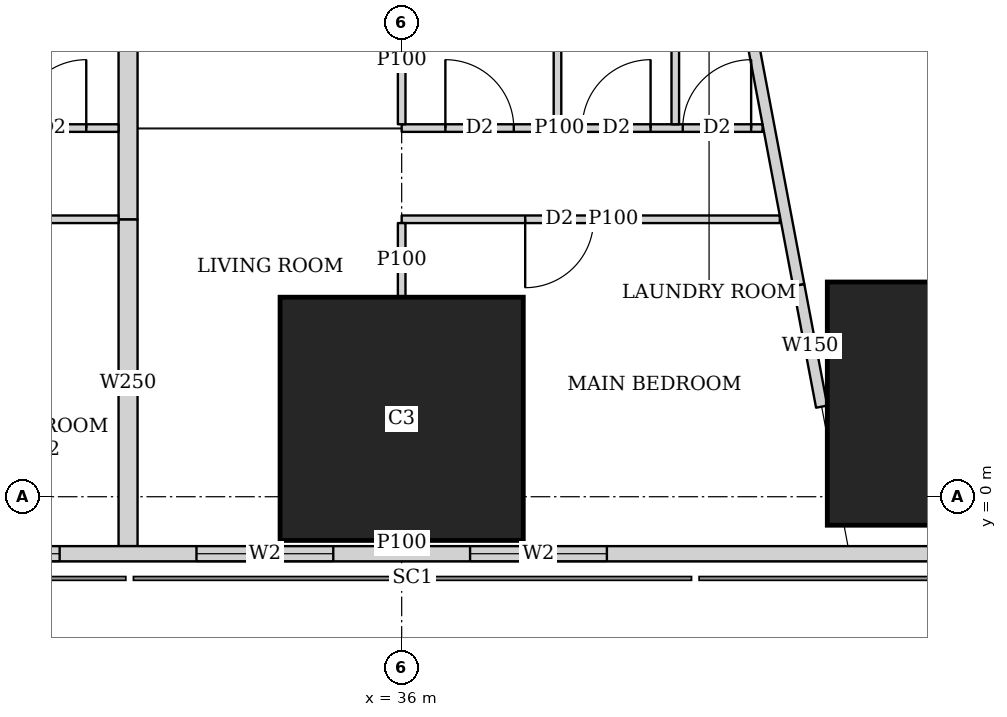
"""IFC4 building model, lengths in metres.
Left out: names, types, materials, properties, quantities, classifications, styles, units other than length and angle.
Written with IfcOpenShell. Run it as: python <this file> out.ifc"""

import sys

from ifc_helpers import new_model, si_unit, direction, frame, frame_2d, origin, origin_2d, place, context, subcontext, project, spatial, rectangle, extrude, element, fill, save


model = new_model("IFC4")
c1 = context("Model", 3, precision=1e-05, world=origin(), true_north=direction((0.0, 1.0)))
c2 = subcontext(c1, "Body", "Model", "MODEL_VIEW")
j1 = project(units=[si_unit("LENGTHUNIT", "METRE"), si_unit("PLANEANGLEUNIT", "RADIAN")], contexts=[c1])
p1 = place(None, origin())
s1 = spatial("IfcSite", under=j1, at=p1, CompositionType="ELEMENT")
p2 = place(p1, origin())
s2 = spatial("IfcBuilding", under=s1, at=p2, CompositionType="ELEMENT")
p3 = place(p2, frame((0.0, 0.0, 23.75)))
s3 = spatial("IfcBuildingStorey", under=s2, at=p3, CompositionType="ELEMENT", Elevation=23.75)
for number, where, z_axis, x_axis in (
    (1, (36.0, 1.025, 0.0), (0.0, 0.0, 1.0), (1.0, 0.0, 0.0)),
    (2, (43.2, 1.225, 0.0), (0.0, 0.0, 1.0), (1.0, 0.0, 0.0)),
):
    element("IfcColumn", number, at=place(p3, frame(where, z_axis=z_axis, x_axis=x_axis)), inside=s3, PredefinedType="COLUMN", context=c2, shape_type="SweptSolid", body=[
        extrude(rectangle(XDim=3.2, YDim=3.2, at=origin_2d()), origin(), (0.0, 0.0, 1.0), 3.75),
    ])
p4 = place(p3, frame((2.163, -0.75, 0.0), z_axis=(0.0, 0.0, 1.0), x_axis=(1.0, 0.0, 0.0)))
e3 = element("IfcWall", 3, at=p4, inside=s3, PredefinedType="SOLIDWALL", context=c2, shape_type="SweptSolid", body=[
    extrude(rectangle(XDim=45.628, YDim=0.2, at=frame_2d((22.814, 0.0))), origin(), (0.0, 0.0, 1.0), 3.5),
])
p5 = place(p4, frame((9.537, 0.0, 0.9)))
e4 = element("IfcOpeningElement", 4, at=p5, cuts=e3, PredefinedType="OPENING", context=c2, shape_type="SweptSolid", body=[
    extrude(rectangle(XDim=1.8, YDim=1.5, at=frame_2d((0.9, 0.75))), frame((0.0, 0.11, 0.0), z_axis=(0.0, -1.0, 0.0), x_axis=(1.0, 0.0, 0.0)), (0.0, 0.0, 1.0), 0.22),
])
p6 = place(p4, frame((13.137, 0.0, 0.9)))
e5 = element("IfcOpeningElement", 5, at=p6, cuts=e3, PredefinedType="OPENING", context=c2, shape_type="SweptSolid", body=[
    extrude(rectangle(XDim=1.8, YDim=1.5, at=frame_2d((0.9, 0.75))), frame((0.0, 0.11, 0.0), z_axis=(0.0, -1.0, 0.0), x_axis=(1.0, 0.0, 0.0)), (0.0, 0.0, 1.0), 0.22),
])
p7 = place(p4, frame((16.737, 0.0, 0.9)))
e6 = element("IfcOpeningElement", 6, at=p7, cuts=e3, PredefinedType="OPENING", context=c2, shape_type="SweptSolid", body=[
    extrude(rectangle(XDim=1.8, YDim=1.5, at=frame_2d((0.9, 0.75))), frame((0.0, 0.11, 0.0), z_axis=(0.0, -1.0, 0.0), x_axis=(1.0, 0.0, 0.0)), (0.0, 0.0, 1.0), 0.22),
])
p8 = place(p4, frame((20.337, 0.0, 0.9)))
e7 = element("IfcOpeningElement", 7, at=p8, cuts=e3, PredefinedType="OPENING", context=c2, shape_type="SweptSolid", body=[
    extrude(rectangle(XDim=1.8, YDim=1.5, at=frame_2d((0.9, 0.75))), frame((0.0, 0.11, 0.0), z_axis=(0.0, -1.0, 0.0), x_axis=(1.0, 0.0, 0.0)), (0.0, 0.0, 1.0), 0.22),
])
p9 = place(p4, frame((23.937, 0.0, 0.9)))
e8 = element("IfcOpeningElement", 8, at=p9, cuts=e3, PredefinedType="OPENING", context=c2, shape_type="SweptSolid", body=[
    extrude(rectangle(XDim=1.8, YDim=1.5, at=frame_2d((0.9, 0.75))), frame((0.0, 0.11, 0.0), z_axis=(0.0, -1.0, 0.0), x_axis=(1.0, 0.0, 0.0)), (0.0, 0.0, 1.0), 0.22),
])
p10 = place(p4, frame((27.537, 0.0, 0.9)))
e9 = element("IfcOpeningElement", 9, at=p10, cuts=e3, PredefinedType="OPENING", context=c2, shape_type="SweptSolid", body=[
    extrude(rectangle(XDim=1.8, YDim=1.5, at=frame_2d((0.9, 0.75))), frame((0.0, 0.11, 0.0), z_axis=(0.0, -1.0, 0.0), x_axis=(1.0, 0.0, 0.0)), (0.0, 0.0, 1.0), 0.22),
])
p11 = place(p4, frame((31.137, 0.0, 0.9)))
e10 = element("IfcOpeningElement", 10, at=p11, cuts=e3, PredefinedType="OPENING", context=c2, shape_type="SweptSolid", body=[
    extrude(rectangle(XDim=1.8, YDim=1.5, at=frame_2d((0.9, 0.75))), frame((0.0, 0.11, 0.0), z_axis=(0.0, -1.0, 0.0), x_axis=(1.0, 0.0, 0.0)), (0.0, 0.0, 1.0), 0.22),
])
p12 = place(p4, frame((34.737, 0.0, 0.9)))
e11 = element("IfcOpeningElement", 11, at=p12, cuts=e3, PredefinedType="OPENING", context=c2, shape_type="SweptSolid", body=[
    extrude(rectangle(XDim=1.8, YDim=1.5, at=frame_2d((0.9, 0.75))), frame((0.0, 0.11, 0.0), z_axis=(0.0, -1.0, 0.0), x_axis=(1.0, 0.0, 0.0)), (0.0, 0.0, 1.0), 0.22),
])
p13 = place(p3, frame((50.653, 2.703, 0.0), z_axis=(0.0, 0.0, 1.0), x_axis=(-0.185612026696, 0.982623109613, 0.0)))
e12 = element("IfcWall", 12, at=p13, inside=s3, PredefinedType="SOLIDWALL", context=c2, shape_type="SweptSolid", body=[
    extrude(rectangle(XDim=41.393, YDim=0.2, at=frame_2d((20.697, 0.0))), origin(), (0.0, 0.0, 1.0), 3.5),
])
p14 = place(p13, frame((1.633, 0.0, 0.9)))
e13 = element("IfcOpeningElement", 13, at=p14, cuts=e12, PredefinedType="OPENING", context=c2, shape_type="SweptSolid", body=[
    extrude(rectangle(XDim=1.8, YDim=1.5, at=frame_2d((0.9, 0.75))), frame((0.0, 0.11, 0.0), z_axis=(0.0, -1.0, 0.0), x_axis=(1.0, 0.0, 0.0)), (0.0, 0.0, 1.0), 0.22),
])
p15 = place(p13, frame((6.032, 0.0, 0.9)))
e14 = element("IfcOpeningElement", 14, at=p15, cuts=e12, PredefinedType="OPENING", context=c2, shape_type="SweptSolid", body=[
    extrude(rectangle(XDim=1.8, YDim=1.5, at=frame_2d((0.9, 0.75))), frame((0.0, 0.11, 0.0), z_axis=(0.0, -1.0, 0.0), x_axis=(1.0, 0.0, 0.0)), (0.0, 0.0, 1.0), 0.22),
])
p16 = place(p13, frame((9.848, 0.0, 0.9)))
e15 = element("IfcOpeningElement", 15, at=p16, cuts=e12, PredefinedType="OPENING", context=c2, shape_type="SweptSolid", body=[
    extrude(rectangle(XDim=1.8, YDim=1.5, at=frame_2d((0.9, 0.75))), frame((0.0, 0.11, 0.0), z_axis=(0.0, -1.0, 0.0), x_axis=(1.0, 0.0, 0.0)), (0.0, 0.0, 1.0), 0.22),
])
p17 = place(p13, frame((17.481, 0.0, 0.9)))
e16 = element("IfcOpeningElement", 16, at=p17, cuts=e12, PredefinedType="OPENING", context=c2, shape_type="SweptSolid", body=[
    extrude(rectangle(XDim=1.8, YDim=1.5, at=frame_2d((0.9, 0.75))), frame((0.0, 0.11, 0.0), z_axis=(0.0, -1.0, 0.0), x_axis=(1.0, 0.0, 0.0)), (0.0, 0.0, 1.0), 0.22),
])
p18 = place(p13, frame((21.297, 0.0, 0.9)))
e17 = element("IfcOpeningElement", 17, at=p18, cuts=e12, PredefinedType="OPENING", context=c2, shape_type="SweptSolid", body=[
    extrude(rectangle(XDim=1.8, YDim=1.5, at=frame_2d((0.9, 0.75))), frame((0.0, 0.11, 0.0), z_axis=(0.0, -1.0, 0.0), x_axis=(1.0, 0.0, 0.0)), (0.0, 0.0, 1.0), 0.22),
])
p19 = place(p13, frame((25.113, 0.0, 0.9)))
e18 = element("IfcOpeningElement", 18, at=p19, cuts=e12, PredefinedType="OPENING", context=c2, shape_type="SweptSolid", body=[
    extrude(rectangle(XDim=1.8, YDim=1.5, at=frame_2d((0.9, 0.75))), frame((0.0, 0.11, 0.0), z_axis=(0.0, -1.0, 0.0), x_axis=(1.0, 0.0, 0.0)), (0.0, 0.0, 1.0), 0.22),
])
p20 = place(p13, frame((28.93, 0.0, 0.9)))
e19 = element("IfcOpeningElement", 19, at=p20, cuts=e12, PredefinedType="OPENING", context=c2, shape_type="SweptSolid", body=[
    extrude(rectangle(XDim=1.8, YDim=1.5, at=frame_2d((0.9, 0.75))), frame((0.0, 0.11, 0.0), z_axis=(0.0, -1.0, 0.0), x_axis=(1.0, 0.0, 0.0)), (0.0, 0.0, 1.0), 0.22),
])
p21 = place(p13, frame((32.746, 0.0, 0.9)))
e20 = element("IfcOpeningElement", 20, at=p21, cuts=e12, PredefinedType="OPENING", context=c2, shape_type="SweptSolid", body=[
    extrude(rectangle(XDim=1.8, YDim=1.5, at=frame_2d((0.9, 0.75))), frame((0.0, 0.11, 0.0), z_axis=(0.0, -1.0, 0.0), x_axis=(1.0, 0.0, 0.0)), (0.0, 0.0, 1.0), 0.22),
])
p22 = place(p13, frame((36.481, 0.0, 0.9)))
e21 = element("IfcOpeningElement", 21, at=p22, cuts=e12, PredefinedType="OPENING", context=c2, shape_type="SweptSolid", body=[
    extrude(rectangle(XDim=1.8, YDim=1.5, at=frame_2d((0.9, 0.75))), frame((0.0, 0.11, 0.0), z_axis=(0.0, -1.0, 0.0), x_axis=(1.0, 0.0, 0.0)), (0.0, 0.0, 1.0), 0.22),
])
p23 = place(p3, frame((33.755, 42.325, 0.0), z_axis=(0.0, 0.0, 1.0), x_axis=(0.185611461091, -0.982623216453, 0.0)))
e22 = element("IfcWall", 22, at=p23, inside=s3, PredefinedType="SOLIDWALL", context=c2, shape_type="SweptSolid", body=[
    extrude(rectangle(XDim=40.241, YDim=0.15, at=frame_2d((20.121, 0.0))), origin(), (0.0, 0.0, 1.0), 2.5),
])
p24 = place(p23, frame((7.325, 0.0, 0.0)))
e23 = element("IfcOpeningElement", 23, at=p24, cuts=e22, PredefinedType="OPENING", context=c2, shape_type="SweptSolid", body=[
    extrude(rectangle(XDim=1.0, YDim=2.1, at=frame_2d((0.5, 1.05))), frame((0.0, 0.085, 0.0), z_axis=(0.0, -1.0, 0.0), x_axis=(1.0, 0.0, 0.0)), (0.0, 0.0, 1.0), 0.17),
])
p25 = place(p23, frame((11.902, 0.0, 0.0)))
e24 = element("IfcOpeningElement", 24, at=p25, cuts=e22, PredefinedType="OPENING", context=c2, shape_type="SweptSolid", body=[
    extrude(rectangle(XDim=1.0, YDim=2.1, at=frame_2d((0.5, 1.05))), frame((0.0, 0.085, 0.0), z_axis=(0.0, -1.0, 0.0), x_axis=(1.0, 0.0, 0.0)), (0.0, 0.0, 1.0), 0.17),
])
p26 = place(p23, frame((25.718, 0.0, 0.0)))
e25 = element("IfcOpeningElement", 25, at=p26, cuts=e22, PredefinedType="OPENING", context=c2, shape_type="SweptSolid", body=[
    extrude(rectangle(XDim=1.0, YDim=2.1, at=frame_2d((0.5, 1.05))), frame((0.0, 0.085, 0.0), z_axis=(0.0, -1.0, 0.0), x_axis=(1.0, 0.0, 0.0)), (0.0, 0.0, 1.0), 0.17),
])
p27 = place(p23, frame((31.788, 0.0, 0.0)))
e26 = element("IfcOpeningElement", 26, at=p27, cuts=e22, PredefinedType="OPENING", context=c2, shape_type="SweptSolid", body=[
    extrude(rectangle(XDim=1.0, YDim=2.1, at=frame_2d((0.5, 1.05))), frame((0.0, 0.085, 0.0), z_axis=(0.0, -1.0, 0.0), x_axis=(1.0, 0.0, 0.0)), (0.0, 0.0, 1.0), 0.17),
])
p28 = place(p3, frame((41.224, 2.783, 0.0), z_axis=(0.0, 0.0, 1.0), x_axis=(0.185566507215, -0.982631706897, 0.0)))
e27 = element("IfcWall", 27, at=p28, inside=s3, PredefinedType="SOLIDWALL", context=c2, shape_type="SweptSolid", body=[
    extrude(rectangle(XDim=1.626, YDim=0.15, at=frame_2d((0.813, 0.0))), origin(), (0.0, 0.0, 1.0), 2.05),
])
p29 = place(p3, frame((32.275, 3.65, 0.0), z_axis=(0.0, 0.0, 1.0), x_axis=(-1.0, 0.0, 0.0)))
e28 = element("IfcWall", 28, at=p29, inside=s3, PredefinedType="PARTITIONING", context=c2, shape_type="SweptSolid", body=[
    extrude(rectangle(XDim=7.075, YDim=0.1, at=frame_2d((3.538, 0.0))), origin(), (0.0, 0.0, 1.0), 3.5),
])
p30 = place(p29, frame((5.975, 0.0, 0.0)))
e29 = element("IfcOpeningElement", 29, at=p30, cuts=e28, PredefinedType="OPENING", context=c2, shape_type="SweptSolid", body=[
    extrude(rectangle(XDim=0.9, YDim=2.1, at=frame_2d((0.45, 1.05))), frame((0.0, 0.06, 0.0), z_axis=(0.0, -1.0, 0.0), x_axis=(1.0, 0.0, 0.0)), (0.0, 0.0, 1.0), 0.12),
])
p31 = place(p29, frame((0.95, 0.0, 0.0)))
e30 = element("IfcOpeningElement", 30, at=p31, cuts=e28, PredefinedType="OPENING", context=c2, shape_type="SweptSolid", body=[
    extrude(rectangle(XDim=0.9, YDim=2.1, at=frame_2d((0.45, 1.05))), frame((0.0, 0.06, 0.0), z_axis=(0.0, -1.0, 0.0), x_axis=(1.0, 0.0, 0.0)), (0.0, 0.0, 1.0), 0.12),
])
p32 = place(p3, frame((32.275, 4.85, 0.0), z_axis=(0.0, 0.0, 1.0), x_axis=(-1.0, 0.0, 0.0)))
e31 = element("IfcWall", 31, at=p32, inside=s3, PredefinedType="PARTITIONING", context=c2, shape_type="SweptSolid", body=[
    extrude(rectangle(XDim=7.075, YDim=0.1, at=frame_2d((3.538, 0.0))), origin(), (0.0, 0.0, 1.0), 3.5),
])
p33 = place(p32, frame((5.6, 0.0, 0.0)))
e32 = element("IfcOpeningElement", 32, at=p33, cuts=e31, PredefinedType="OPENING", context=c2, shape_type="SweptSolid", body=[
    extrude(rectangle(XDim=0.9, YDim=2.1, at=frame_2d((0.45, 1.05))), frame((0.0, 0.06, 0.0), z_axis=(0.0, -1.0, 0.0), x_axis=(1.0, 0.0, 0.0)), (0.0, 0.0, 1.0), 0.12),
])
p34 = place(p32, frame((2.225, 0.0, 0.0)))
e33 = element("IfcOpeningElement", 33, at=p34, cuts=e31, PredefinedType="OPENING", context=c2, shape_type="SweptSolid", body=[
    extrude(rectangle(XDim=0.9, YDim=2.1, at=frame_2d((0.45, 1.05))), frame((0.0, 0.06, 0.0), z_axis=(0.0, -1.0, 0.0), x_axis=(1.0, 0.0, 0.0)), (0.0, 0.0, 1.0), 0.12),
])
p35 = place(p32, frame((3.8, 0.0, 0.0)))
e34 = element("IfcOpeningElement", 34, at=p35, cuts=e31, PredefinedType="OPENING", context=c2, shape_type="SweptSolid", body=[
    extrude(rectangle(XDim=0.9, YDim=2.1, at=frame_2d((0.45, 1.05))), frame((0.0, 0.06, 0.0), z_axis=(0.0, -1.0, 0.0), x_axis=(1.0, 0.0, 0.0)), (0.0, 0.0, 1.0), 0.12),
])
p36 = place(p32, frame((0.425, 0.0, 0.0)))
e35 = element("IfcOpeningElement", 35, at=p36, cuts=e31, PredefinedType="OPENING", context=c2, shape_type="SweptSolid", body=[
    extrude(rectangle(XDim=0.9, YDim=2.1, at=frame_2d((0.45, 1.05))), frame((0.0, 0.06, 0.0), z_axis=(0.0, -1.0, 0.0), x_axis=(1.0, 0.0, 0.0)), (0.0, 0.0, 1.0), 0.12),
])
p37 = place(p3, frame((40.975, 3.65, 0.0), z_axis=(0.0, 0.0, 1.0), x_axis=(-1.0, 0.0, 0.0)))
e36 = element("IfcWall", 36, at=p37, inside=s3, PredefinedType="PARTITIONING", context=c2, shape_type="SweptSolid", body=[
    extrude(rectangle(XDim=4.975, YDim=0.1, at=frame_2d((2.488, 0.0))), origin(), (0.0, 0.0, 1.0), 3.5),
])
p38 = place(p37, frame((2.45, 0.0, 0.0)))
e37 = element("IfcOpeningElement", 37, at=p38, cuts=e36, PredefinedType="OPENING", context=c2, shape_type="SweptSolid", body=[
    extrude(rectangle(XDim=0.9, YDim=2.1, at=frame_2d((0.45, 1.05))), frame((0.0, 0.06, 0.0), z_axis=(0.0, -1.0, 0.0), x_axis=(1.0, 0.0, 0.0)), (0.0, 0.0, 1.0), 0.12),
])
p39 = place(p3, frame((40.748, 4.85, 0.0), z_axis=(0.0, 0.0, 1.0), x_axis=(-1.0, 0.0, 0.0)))
e38 = element("IfcWall", 38, at=p39, inside=s3, PredefinedType="PARTITIONING", context=c2, shape_type="SweptSolid", body=[
    extrude(rectangle(XDim=4.748, YDim=0.1, at=frame_2d((2.374, 0.0))), origin(), (0.0, 0.0, 1.0), 3.5),
])
p40 = place(p39, frame((3.273, 0.0, 0.0)))
e39 = element("IfcOpeningElement", 39, at=p40, cuts=e38, PredefinedType="OPENING", context=c2, shape_type="SweptSolid", body=[
    extrude(rectangle(XDim=0.9, YDim=2.1, at=frame_2d((0.45, 1.05))), frame((0.0, 0.06, 0.0), z_axis=(0.0, -1.0, 0.0), x_axis=(1.0, 0.0, 0.0)), (0.0, 0.0, 1.0), 0.12),
])
p41 = place(p39, frame((0.15, 0.0, 0.0)))
e40 = element("IfcOpeningElement", 40, at=p41, cuts=e38, PredefinedType="OPENING", context=c2, shape_type="SweptSolid", body=[
    extrude(rectangle(XDim=0.9, YDim=2.1, at=frame_2d((0.45, 1.05))), frame((0.0, 0.06, 0.0), z_axis=(0.0, -1.0, 0.0), x_axis=(1.0, 0.0, 0.0)), (0.0, 0.0, 1.0), 0.12),
])
p42 = place(p39, frame((1.473, 0.0, 0.0)))
e41 = element("IfcOpeningElement", 41, at=p42, cuts=e38, PredefinedType="OPENING", context=c2, shape_type="SweptSolid", body=[
    extrude(rectangle(XDim=0.9, YDim=2.1, at=frame_2d((0.45, 1.05))), frame((0.0, 0.06, 0.0), z_axis=(0.0, -1.0, 0.0), x_axis=(1.0, 0.0, 0.0)), (0.0, 0.0, 1.0), 0.12),
])
p43 = place(p3, frame((36.0, -0.65, 0.0), z_axis=(0.0, 0.0, 1.0), x_axis=(0.0, 1.0, 0.0)))
e42 = element("IfcWall", 42, at=p43, inside=s3, PredefinedType="PARTITIONING", context=c2, shape_type="SweptSolid", body=[
    extrude(rectangle(XDim=0.074, YDim=0.1, at=frame_2d((0.037, 0.0))), origin(), (0.0, 0.0, 1.0), 3.5),
])
p44 = place(p3, frame((36.0, 2.626, 0.0), z_axis=(0.0, 0.0, 1.0), x_axis=(0.0, 1.0, 0.0)))
e43 = element("IfcWall", 43, at=p44, inside=s3, PredefinedType="PARTITIONING", context=c2, shape_type="SweptSolid", body=[
    extrude(rectangle(XDim=0.974, YDim=0.1, at=frame_2d((0.487, 0.0))), origin(), (0.0, 0.0, 1.0), 3.5),
])
p45 = place(p3, frame((36.0, 4.9, 0.0), z_axis=(0.0, 0.0, 1.0), x_axis=(0.0, 1.0, 0.0)))
e44 = element("IfcWall", 44, at=p45, inside=s3, PredefinedType="PARTITIONING", context=c2, shape_type="SweptSolid", body=[
    extrude(rectangle(XDim=1.699, YDim=0.1, at=frame_2d((0.85, 0.0))), origin(), (0.0, 0.0, 1.0), 3.5),
])
for number, where, z_axis, x_axis in (
    (45, (39.6, 4.9, 0.0), (0.0, 0.0, 1.0), (0.0, 1.0, 0.0)),
    (46, (38.05, 4.9, 0.0), (0.0, 0.0, 1.0), (0.0, 1.0, 0.0)),
):
    element("IfcWall", number, at=place(p3, frame(where, z_axis=z_axis, x_axis=x_axis)), inside=s3, PredefinedType="PARTITIONING", context=c2, shape_type="SweptSolid", body=[
        extrude(rectangle(XDim=3.525, YDim=0.1, at=frame_2d((1.763, 0.0))), origin(), (0.0, 0.0, 1.0), 3.5),
    ])
p46 = place(p3, frame((32.4, -0.65, 0.0), z_axis=(0.0, 0.0, 1.0), x_axis=(0.0, 1.0, 0.0)))
e47 = element("IfcWall", 47, at=p46, inside=s3, PredefinedType="SOLIDWALL", context=c2, shape_type="SweptSolid", body=[
    extrude(rectangle(XDim=4.3, YDim=0.25, at=frame_2d((2.15, 0.0))), origin(), (0.0, 0.0, 1.0), 2.05),
])
p47 = place(p3, frame((32.4, 3.65, 0.0), z_axis=(0.0, 0.0, 1.0), x_axis=(0.0, 1.0, 0.0)))
e48 = element("IfcWall", 48, at=p47, inside=s3, PredefinedType="SOLIDWALL", context=c2, shape_type="SweptSolid", body=[
    extrude(rectangle(XDim=4.775, YDim=0.25, at=frame_2d((2.388, 0.0))), origin(), (0.0, 0.0, 1.0), 3.5),
])
p48 = place(p10, origin())
e49 = element("IfcWindow", 49, at=p48, inside=s3, PartitioningType="SINGLE_PANEL", PredefinedType="WINDOW", context=c2, shape_type="SweptSolid", body=[
    extrude(rectangle(XDim=1.8, YDim=1.5, at=frame_2d((0.9, 0.75))), frame((0.0, 0.03, 0.0), z_axis=(0.0, -1.0, 0.0), x_axis=(1.0, 0.0, 0.0)), (0.0, 0.0, 1.0), 0.06),
])
fill(e9, e49)
p49 = place(p11, origin())
e50 = element("IfcWindow", 50, at=p49, inside=s3, PartitioningType="SINGLE_PANEL", PredefinedType="WINDOW", context=c2, shape_type="SweptSolid", body=[
    extrude(rectangle(XDim=1.8, YDim=1.5, at=frame_2d((0.9, 0.75))), frame((0.0, 0.03, 0.0), z_axis=(0.0, -1.0, 0.0), x_axis=(1.0, 0.0, 0.0)), (0.0, 0.0, 1.0), 0.06),
])
fill(e10, e50)
p50 = place(p12, origin())
e51 = element("IfcWindow", 51, at=p50, inside=s3, PartitioningType="SINGLE_PANEL", PredefinedType="WINDOW", context=c2, shape_type="SweptSolid", body=[
    extrude(rectangle(XDim=1.8, YDim=1.5, at=frame_2d((0.9, 0.75))), frame((0.0, 0.03, 0.0), z_axis=(0.0, -1.0, 0.0), x_axis=(1.0, 0.0, 0.0)), (0.0, 0.0, 1.0), 0.06),
])
fill(e11, e51)
p51 = place(p36, origin())
e52 = element("IfcDoor", 52, at=p51, inside=s3, OperationType="SINGLE_SWING_RIGHT", PredefinedType="DOOR", context=c2, shape_type="SweptSolid", body=[
    extrude(rectangle(XDim=0.9, YDim=2.1, at=frame_2d((0.45, 1.05))), frame((0.0, 0.025, 0.0), z_axis=(0.0, -1.0, 0.0), x_axis=(1.0, 0.0, 0.0)), (0.0, 0.0, 1.0), 0.05),
])
fill(e35, e52)
p52 = place(p38, origin())
e53 = element("IfcDoor", 53, at=p52, inside=s3, OperationType="SINGLE_SWING_RIGHT", PredefinedType="DOOR", context=c2, shape_type="SweptSolid", body=[
    extrude(rectangle(XDim=0.9, YDim=2.1, at=frame_2d((0.45, 1.05))), frame((0.0, 0.025, 0.0), z_axis=(0.0, -1.0, 0.0), x_axis=(1.0, 0.0, 0.0)), (0.0, 0.0, 1.0), 0.05),
])
fill(e37, e53)
p53 = place(p40, origin())
e54 = element("IfcDoor", 54, at=p53, inside=s3, OperationType="SINGLE_SWING_LEFT", PredefinedType="DOOR", context=c2, shape_type="SweptSolid", body=[
    extrude(rectangle(XDim=0.9, YDim=2.1, at=frame_2d((0.45, 1.05))), frame((0.0, 0.025, 0.0), z_axis=(0.0, -1.0, 0.0), x_axis=(1.0, 0.0, 0.0)), (0.0, 0.0, 1.0), 0.05),
])
fill(e39, e54)
p54 = place(p41, origin())
e55 = element("IfcDoor", 55, at=p54, inside=s3, OperationType="SINGLE_SWING_RIGHT", PredefinedType="DOOR", context=c2, shape_type="SweptSolid", body=[
    extrude(rectangle(XDim=0.9, YDim=2.1, at=frame_2d((0.45, 1.05))), frame((0.0, 0.025, 0.0), z_axis=(0.0, -1.0, 0.0), x_axis=(1.0, 0.0, 0.0)), (0.0, 0.0, 1.0), 0.05),
])
fill(e40, e55)
p55 = place(p42, origin())
e56 = element("IfcDoor", 56, at=p55, inside=s3, OperationType="SINGLE_SWING_RIGHT", PredefinedType="DOOR", context=c2, shape_type="SweptSolid", body=[
    extrude(rectangle(XDim=0.9, YDim=2.1, at=frame_2d((0.45, 1.05))), frame((0.0, 0.025, 0.0), z_axis=(0.0, -1.0, 0.0), x_axis=(1.0, 0.0, 0.0)), (0.0, 0.0, 1.0), 0.05),
])
fill(e41, e56)
save(model, sys.argv[1])
